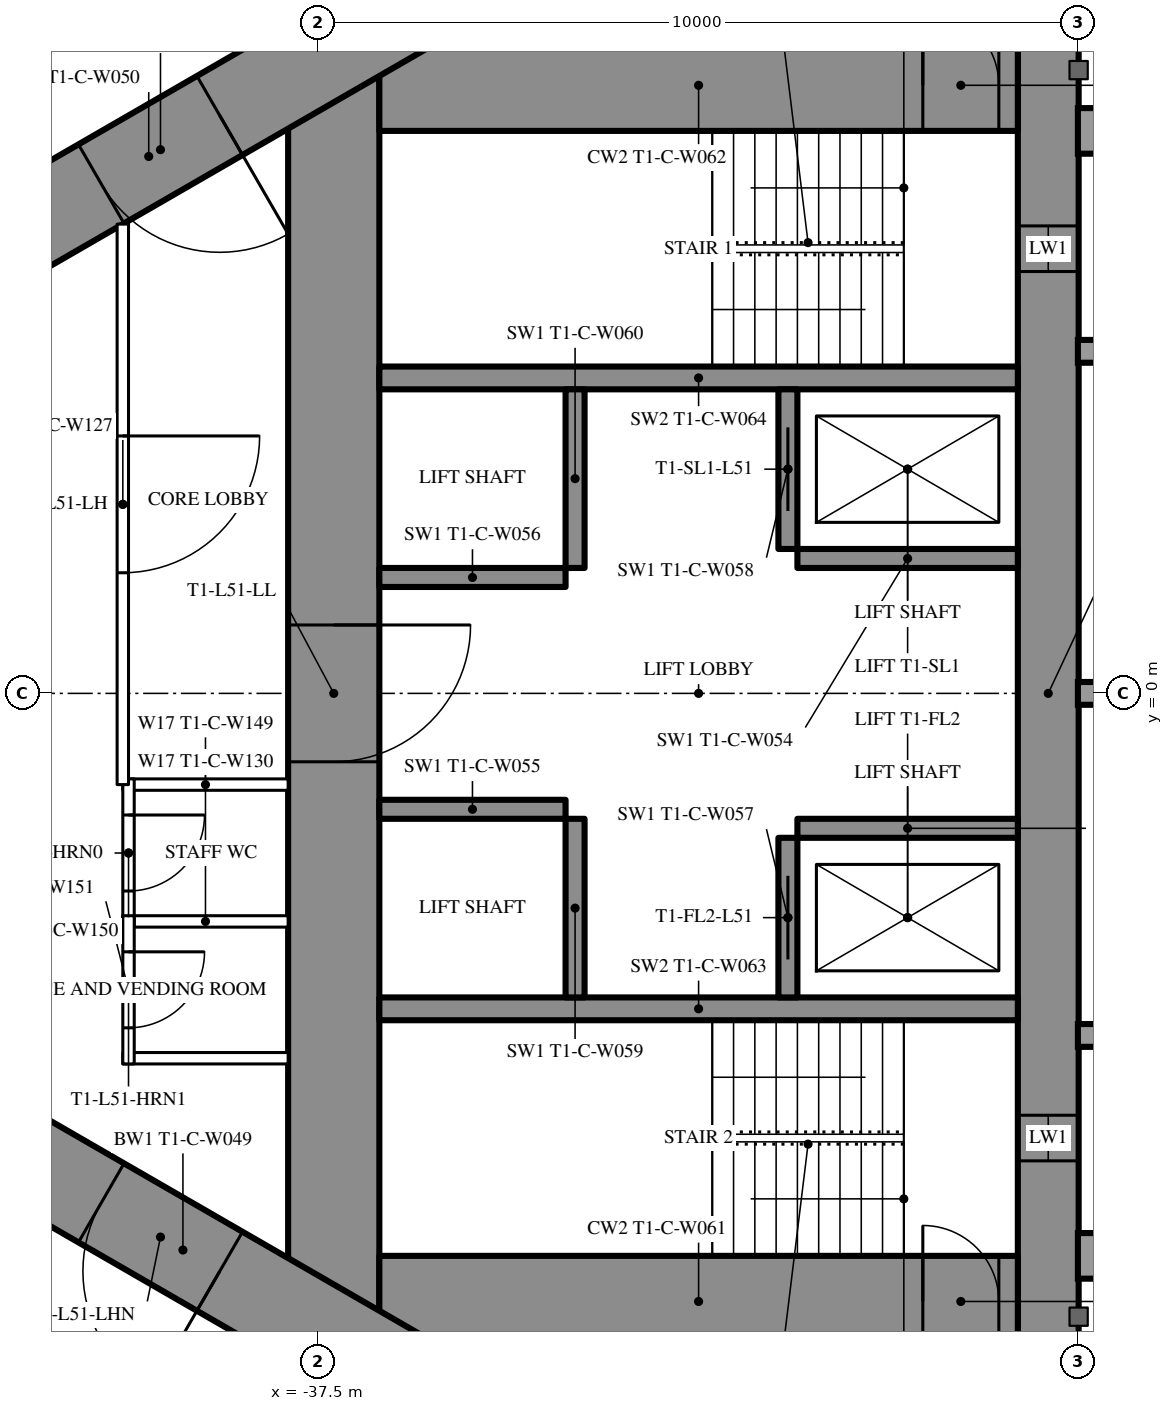
"""IFC4 building model, lengths in metres.
Left out: names, types, materials, properties, quantities, classifications, styles, units other than length and angle.
Written with IfcOpenShell. Run it as: python <this file> out.ifc"""

import sys

from ifc_helpers import new_model, si_unit, direction, frame, frame_2d, origin, place, context, subcontext, project, spatial, rectangle, extrude, element, fill, save


model = new_model("IFC4")
c1 = context("Model", 3, precision=1e-05, world=origin(), true_north=direction((0.0, 1.0)))
c2 = subcontext(c1, "Body", "Model", "MODEL_VIEW")
j1 = project(units=[si_unit("LENGTHUNIT", "METRE"), si_unit("PLANEANGLEUNIT", "RADIAN")], contexts=[c1])
p1 = place(None, origin())
s1 = spatial("IfcSite", under=j1, at=p1, CompositionType="ELEMENT")
p2 = place(p1, origin())
s2 = spatial("IfcBuilding", under=s1, at=p2, CompositionType="ELEMENT")
p3 = place(p2, frame((0.0, 0.0, 191.3)))
s3 = spatial("IfcBuildingStorey", under=s2, at=p3, CompositionType="ELEMENT", Elevation=191.3)
p4 = place(p3, frame((-27.9, 8.6, 0.0), z_axis=(0.0, 0.0, 1.0), x_axis=(0.0, -1.0, 0.0)))
e1 = element("IfcWall", 1, at=p4, inside=s3, PredefinedType="SHEAR", context=c2, shape_type="SweptSolid", body=[
    extrude(rectangle(XDim=17.2, YDim=0.8, at=frame_2d((8.6, 0.0))), origin(), (0.0, 0.0, 1.0), 3.5),
])
p5 = place(p4, frame((2.45, 0.0, 0.6)))
e2 = element("IfcOpeningElement", 2, at=p5, cuts=e1, PredefinedType="OPENING", context=c2, shape_type="SweptSolid", body=[
    extrude(rectangle(XDim=0.6, YDim=2.1, at=frame_2d((0.3, 1.05))), frame((0.0, 0.41, 0.0), z_axis=(0.0, -1.0, 0.0), x_axis=(1.0, 0.0, 0.0)), (0.0, 0.0, 1.0), 0.82),
])
p6 = place(p4, frame((14.15, 0.0, 0.6)))
e3 = element("IfcOpeningElement", 3, at=p6, cuts=e1, PredefinedType="OPENING", context=c2, shape_type="SweptSolid", body=[
    extrude(rectangle(XDim=0.6, YDim=2.1, at=frame_2d((0.3, 1.05))), frame((0.0, 0.41, 0.0), z_axis=(0.0, -1.0, 0.0), x_axis=(1.0, 0.0, 0.0)), (0.0, 0.0, 1.0), 0.82),
])
p7 = place(p3, frame((-37.3, 8.6, 0.0), z_axis=(0.0, 0.0, 1.0), x_axis=(0.0, -1.0, 0.0)))
e4 = element("IfcWall", 4, at=p7, inside=s3, PredefinedType="SHEAR", context=c2, shape_type="SweptSolid", body=[
    extrude(rectangle(XDim=17.2, YDim=1.2, at=frame_2d((8.6, 0.0))), origin(), (0.0, 0.0, 1.0), 3.5),
])
p8 = place(p7, frame((7.7, 0.0, 0.0)))
e5 = element("IfcOpeningElement", 5, at=p8, cuts=e4, PredefinedType="OPENING", context=c2, shape_type="SweptSolid", body=[
    extrude(rectangle(XDim=1.8, YDim=2.2, at=frame_2d((0.9, 1.1))), frame((0.0, 0.61, 0.0), z_axis=(0.0, -1.0, 0.0), x_axis=(1.0, 0.0, 0.0)), (0.0, 0.0, 1.0), 1.22),
])
p9 = place(p3, frame((-28.3, 8.0, 0.0), z_axis=(0.0, 0.0, 1.0), x_axis=(-1.0, 0.0, 0.0)))
e6 = element("IfcWall", 6, at=p9, inside=s3, PredefinedType="SHEAR", context=c2, shape_type="SweptSolid", body=[
    extrude(rectangle(XDim=8.4, YDim=1.2, at=frame_2d((4.2, 0.0))), origin(), (0.0, 0.0, 1.0), 3.5),
])
p10 = place(p9, frame((0.25, 0.0, 0.0)))
e7 = element("IfcOpeningElement", 7, at=p10, cuts=e6, PredefinedType="OPENING", context=c2, shape_type="SweptSolid", body=[
    extrude(rectangle(XDim=1.0, YDim=2.2, at=frame_2d((0.5, 1.1))), frame((0.0, 0.61, 0.0), z_axis=(0.0, -1.0, 0.0), x_axis=(1.0, 0.0, 0.0)), (0.0, 0.0, 1.0), 1.22),
])
p11 = place(p3, frame((-28.3, -8.0, 0.0), z_axis=(0.0, 0.0, 1.0), x_axis=(-1.0, 0.0, 0.0)))
e8 = element("IfcWall", 8, at=p11, inside=s3, PredefinedType="SHEAR", context=c2, shape_type="SweptSolid", body=[
    extrude(rectangle(XDim=8.4, YDim=1.2, at=frame_2d((4.2, 0.0))), origin(), (0.0, 0.0, 1.0), 3.5),
])
p12 = place(p11, frame((0.25, 0.0, 0.0)))
e9 = element("IfcOpeningElement", 9, at=p12, cuts=e8, PredefinedType="OPENING", context=c2, shape_type="SweptSolid", body=[
    extrude(rectangle(XDim=1.0, YDim=2.2, at=frame_2d((0.5, 1.1))), frame((0.0, 0.61, 0.0), z_axis=(0.0, -1.0, 0.0), x_axis=(1.0, 0.0, 0.0)), (0.0, 0.0, 1.0), 1.22),
])
for number, where, z_axis, x_axis in (
    (10, (-28.3, 4.15, 0.0), (0.0, 0.0, 1.0), (-1.0, 0.0, 0.0)),
    (11, (-28.3, -4.15, 0.0), (0.0, 0.0, 1.0), (-1.0, 0.0, 0.0)),
):
    element("IfcWall", number, at=place(p3, frame(where, z_axis=z_axis, x_axis=x_axis)), inside=s3, PredefinedType="SHEAR", context=c2, shape_type="SweptSolid", body=[
        extrude(rectangle(XDim=8.4, YDim=0.3, at=frame_2d((4.2, 0.0))), origin(), (0.0, 0.0, 1.0), 3.5),
    ])
p13 = place(p3, frame((-31.325, 4.0, 0.0), z_axis=(0.0, 0.0, 1.0), x_axis=(0.0, -1.0, 0.0)))
e12 = element("IfcWall", 12, at=p13, inside=s3, PredefinedType="SHEAR", context=c2, shape_type="SweptSolid", body=[
    extrude(rectangle(XDim=2.1, YDim=0.25, at=frame_2d((1.05, 0.0))), origin(), (0.0, 0.0, 1.0), 3.5),
])
p14 = place(p13, frame((0.5, 0.0, 0.0)))
e13 = element("IfcOpeningElement", 13, at=p14, cuts=e12, PredefinedType="OPENING", context=c2, shape_type="SweptSolid", body=[
    extrude(rectangle(XDim=1.1, YDim=2.2, at=frame_2d((0.55, 1.1))), frame((0.0, 0.135, 0.0), z_axis=(0.0, -1.0, 0.0), x_axis=(1.0, 0.0, 0.0)), (0.0, 0.0, 1.0), 0.27),
])
p15 = place(p3, frame((-34.125, 4.0, 0.0), z_axis=(0.0, 0.0, 1.0), x_axis=(0.0, -1.0, 0.0)))
e14 = element("IfcWall", 14, at=p15, inside=s3, PredefinedType="SHEAR", context=c2, shape_type="SweptSolid", body=[
    extrude(rectangle(XDim=2.35, YDim=0.25, at=frame_2d((1.175, 0.0))), origin(), (0.0, 0.0, 1.0), 3.5),
])
p16 = place(p3, frame((-28.3, 1.775, 0.0), z_axis=(0.0, 0.0, 1.0), x_axis=(-1.0, 0.0, 0.0)))
e15 = element("IfcWall", 15, at=p16, inside=s3, PredefinedType="SHEAR", context=c2, shape_type="SweptSolid", body=[
    extrude(rectangle(XDim=2.9, YDim=0.25, at=frame_2d((1.45, 0.0))), origin(), (0.0, 0.0, 1.0), 3.5),
])
p17 = place(p3, frame((-34.25, 1.525, 0.0), z_axis=(0.0, 0.0, 1.0), x_axis=(-1.0, 0.0, 0.0)))
e16 = element("IfcWall", 16, at=p17, inside=s3, PredefinedType="SHEAR", context=c2, shape_type="SweptSolid", body=[
    extrude(rectangle(XDim=2.45, YDim=0.25, at=frame_2d((1.225, 0.0))), origin(), (0.0, 0.0, 1.0), 3.5),
])
p18 = place(p3, frame((-31.325, -1.9, 0.0), z_axis=(0.0, 0.0, 1.0), x_axis=(0.0, -1.0, 0.0)))
e17 = element("IfcWall", 17, at=p18, inside=s3, PredefinedType="SHEAR", context=c2, shape_type="SweptSolid", body=[
    extrude(rectangle(XDim=2.1, YDim=0.25, at=frame_2d((1.05, 0.0))), origin(), (0.0, 0.0, 1.0), 3.5),
])
p19 = place(p18, frame((0.5, 0.0, 0.0)))
e18 = element("IfcOpeningElement", 18, at=p19, cuts=e17, PredefinedType="OPENING", context=c2, shape_type="SweptSolid", body=[
    extrude(rectangle(XDim=1.1, YDim=2.2, at=frame_2d((0.55, 1.1))), frame((0.0, 0.135, 0.0), z_axis=(0.0, -1.0, 0.0), x_axis=(1.0, 0.0, 0.0)), (0.0, 0.0, 1.0), 0.27),
])
p20 = place(p3, frame((-34.125, -1.65, 0.0), z_axis=(0.0, 0.0, 1.0), x_axis=(0.0, -1.0, 0.0)))
e19 = element("IfcWall", 19, at=p20, inside=s3, PredefinedType="SHEAR", context=c2, shape_type="SweptSolid", body=[
    extrude(rectangle(XDim=2.35, YDim=0.25, at=frame_2d((1.175, 0.0))), origin(), (0.0, 0.0, 1.0), 3.5),
])
p21 = place(p3, frame((-28.3, -1.775, 0.0), z_axis=(0.0, 0.0, 1.0), x_axis=(-1.0, 0.0, 0.0)))
e20 = element("IfcWall", 20, at=p21, inside=s3, PredefinedType="SHEAR", context=c2, shape_type="SweptSolid", body=[
    extrude(rectangle(XDim=2.9, YDim=0.25, at=frame_2d((1.45, 0.0))), origin(), (0.0, 0.0, 1.0), 3.5),
])
p22 = place(p3, frame((-34.25, -1.525, 0.0), z_axis=(0.0, 0.0, 1.0), x_axis=(-1.0, 0.0, 0.0)))
e21 = element("IfcWall", 21, at=p22, inside=s3, PredefinedType="SHEAR", context=c2, shape_type="SweptSolid", body=[
    extrude(rectangle(XDim=2.45, YDim=0.25, at=frame_2d((1.225, 0.0))), origin(), (0.0, 0.0, 1.0), 3.5),
])
p23 = place(p3, frame((-27.2, 14.3, 0.0), z_axis=(0.0, 0.0, 1.0), x_axis=(-0.866026593062, -0.499997940104, 0.0)))
e22 = element("IfcWall", 22, at=p23, inside=s3, PredefinedType="SHEAR", context=c2, shape_type="SweptSolid", body=[
    extrude(rectangle(XDim=28.946, YDim=1.2, at=frame_2d((14.473, 0.0))), origin(), (0.0, 0.0, 1.0), 3.5),
])
p24 = place(p23, frame((4.6, 0.0, 0.0)))
e23 = element("IfcOpeningElement", 23, at=p24, cuts=e22, PredefinedType="OPENING", context=c2, shape_type="SweptSolid", body=[
    extrude(rectangle(XDim=1.0, YDim=2.2, at=frame_2d((0.5, 1.1))), frame((0.0, 0.61, 0.0), z_axis=(0.0, -1.0, 0.0), x_axis=(1.0, 0.0, 0.0)), (0.0, 0.0, 1.0), 1.22),
])
p25 = place(p23, frame((13.395, 0.0, 0.0)))
e24 = element("IfcOpeningElement", 24, at=p25, cuts=e22, PredefinedType="OPENING", context=c2, shape_type="SweptSolid", body=[
    extrude(rectangle(XDim=1.8, YDim=2.2, at=frame_2d((0.9, 1.1))), frame((0.0, 0.61, 0.0), z_axis=(0.0, -1.0, 0.0), x_axis=(1.0, 0.0, 0.0)), (0.0, 0.0, 1.0), 1.22),
])
p26 = place(p3, frame((-27.2, -14.3, 0.0), z_axis=(0.0, 0.0, 1.0), x_axis=(-0.866024021859, 0.500002393557, 0.0)))
e25 = element("IfcWall", 25, at=p26, inside=s3, PredefinedType="SHEAR", context=c2, shape_type="SweptSolid", body=[
    extrude(rectangle(XDim=27.907, YDim=1.2, at=frame_2d((13.954, 0.0))), origin(), (0.0, 0.0, 1.0), 3.5),
])
p27 = place(p26, frame((4.6, 0.0, 0.0)))
e26 = element("IfcOpeningElement", 26, at=p27, cuts=e25, PredefinedType="OPENING", context=c2, shape_type="SweptSolid", body=[
    extrude(rectangle(XDim=1.0, YDim=2.2, at=frame_2d((0.5, 1.1))), frame((0.0, 0.61, 0.0), z_axis=(0.0, -1.0, 0.0), x_axis=(1.0, 0.0, 0.0)), (0.0, 0.0, 1.0), 1.22),
])
p28 = place(p26, frame((13.395, 0.0, 0.0)))
e27 = element("IfcOpeningElement", 27, at=p28, cuts=e25, PredefinedType="OPENING", context=c2, shape_type="SweptSolid", body=[
    extrude(rectangle(XDim=1.8, YDim=2.2, at=frame_2d((0.9, 1.1))), frame((0.0, 0.61, 0.0), z_axis=(0.0, -1.0, 0.0), x_axis=(1.0, 0.0, 0.0)), (0.0, 0.0, 1.0), 1.22),
])
p29 = place(p3, frame((-27.86, 16.575, 0.0), z_axis=(0.0, 0.0, 1.0), x_axis=(-0.866025533911, -0.499999774615, 0.0)))
e28 = element("IfcWall", 28, at=p29, inside=s3, PredefinedType="PARTITIONING", context=c2, shape_type="SweptSolid", body=[
    extrude(rectangle(XDim=33.149, YDim=0.2, at=frame_2d((16.575, 0.0))), origin(), (0.0, 0.0, 1.0), 3.25),
])
p30 = place(p29, frame((3.75, 0.0, 0.0)))
e29 = element("IfcOpeningElement", 29, at=p30, cuts=e28, PredefinedType="OPENING", context=c2, shape_type="SweptSolid", body=[
    extrude(rectangle(XDim=1.0, YDim=2.2, at=frame_2d((0.5, 1.1))), frame((0.0, 0.11, 0.0), z_axis=(0.0, -1.0, 0.0), x_axis=(1.0, 0.0, 0.0)), (0.0, 0.0, 1.0), 0.22),
])
p31 = place(p29, frame((16.402, 0.0, 0.0)))
e30 = element("IfcOpeningElement", 30, at=p31, cuts=e28, PredefinedType="OPENING", context=c2, shape_type="SweptSolid", body=[
    extrude(rectangle(XDim=0.95, YDim=2.2, at=frame_2d((0.475, 1.1))), frame((0.0, 0.11, 0.0), z_axis=(0.0, -1.0, 0.0), x_axis=(1.0, 0.0, 0.0)), (0.0, 0.0, 1.0), 0.22),
])
p32 = place(p29, frame((22.047, 0.0, 0.0)))
e31 = element("IfcOpeningElement", 31, at=p32, cuts=e28, PredefinedType="OPENING", context=c2, shape_type="SweptSolid", body=[
    extrude(rectangle(XDim=0.95, YDim=2.2, at=frame_2d((0.475, 1.1))), frame((0.0, 0.11, 0.0), z_axis=(0.0, -1.0, 0.0), x_axis=(1.0, 0.0, 0.0)), (0.0, 0.0, 1.0), 0.22),
])
p33 = place(p29, frame((30.396, 0.0, 0.0)))
e32 = element("IfcOpeningElement", 32, at=p33, cuts=e28, PredefinedType="OPENING", context=c2, shape_type="SweptSolid", body=[
    extrude(rectangle(XDim=1.8, YDim=2.2, at=frame_2d((0.9, 1.1))), frame((0.0, 0.11, 0.0), z_axis=(0.0, -1.0, 0.0), x_axis=(1.0, 0.0, 0.0)), (0.0, 0.0, 1.0), 0.22),
])
for number, where, z_axis, x_axis in (
    (33, (-37.9, -1.2, 0.0), (0.0, 0.0, 1.0), (-1.0, 0.0, 0.0)),
    (34, (-37.9, -3.0, 0.0), (0.0, 0.0, 1.0), (-1.0, 0.0, 0.0)),
    (35, (-37.9, -4.8, 0.0), (0.0, 0.0, 1.0), (-1.0, 0.0, 0.0)),
):
    element("IfcWall", number, at=place(p3, frame(where, z_axis=z_axis, x_axis=x_axis)), inside=s3, PredefinedType="PARTITIONING", context=c2, shape_type="SweptSolid", body=[
        extrude(rectangle(XDim=2.175, YDim=0.15, at=frame_2d((1.087, 0.0))), origin(), (0.0, 0.0, 1.0), 3.25),
    ])
p34 = place(p3, frame((-40.0, -1.125, 0.0), z_axis=(0.0, 0.0, 1.0), x_axis=(0.0, -1.0, 0.0)))
e36 = element("IfcWall", 36, at=p34, inside=s3, PredefinedType="PARTITIONING", context=c2, shape_type="SweptSolid", body=[
    extrude(rectangle(XDim=1.95, YDim=0.15, at=frame_2d((0.975, 0.0))), origin(), (0.0, 0.0, 1.0), 3.25),
])
p35 = place(p34, frame((0.475, 0.0, 0.0)))
e37 = element("IfcOpeningElement", 37, at=p35, cuts=e36, PredefinedType="OPENING", context=c2, shape_type="SweptSolid", body=[
    extrude(rectangle(XDim=1.0, YDim=2.2, at=frame_2d((0.5, 1.1))), frame((0.0, 0.085, 0.0), z_axis=(0.0, -1.0, 0.0), x_axis=(1.0, 0.0, 0.0)), (0.0, 0.0, 1.0), 0.17),
])
p36 = place(p3, frame((-40.0, -2.925, 0.0), z_axis=(0.0, 0.0, 1.0), x_axis=(0.0, -1.0, 0.0)))
e38 = element("IfcWall", 38, at=p36, inside=s3, PredefinedType="PARTITIONING", context=c2, shape_type="SweptSolid", body=[
    extrude(rectangle(XDim=1.95, YDim=0.15, at=frame_2d((0.975, 0.0))), origin(), (0.0, 0.0, 1.0), 3.25),
])
p37 = place(p36, frame((0.475, 0.0, 0.0)))
e39 = element("IfcOpeningElement", 39, at=p37, cuts=e38, PredefinedType="OPENING", context=c2, shape_type="SweptSolid", body=[
    extrude(rectangle(XDim=1.0, YDim=2.2, at=frame_2d((0.5, 1.1))), frame((0.0, 0.085, 0.0), z_axis=(0.0, -1.0, 0.0), x_axis=(1.0, 0.0, 0.0)), (0.0, 0.0, 1.0), 0.17),
])
p38 = place(p3, frame((-40.075, 6.174, 0.0), z_axis=(0.0, 0.0, 1.0), x_axis=(0.0, -1.0, 0.0)))
e40 = element("IfcWall", 40, at=p38, inside=s3, PredefinedType="PARTITIONING", context=c2, shape_type="SweptSolid", body=[
    extrude(rectangle(XDim=7.374, YDim=0.15, at=frame_2d((3.687, 0.0))), origin(), (0.0, 0.0, 1.0), 3.25),
])
p39 = place(p38, frame((2.787, 0.0, 0.0)))
e41 = element("IfcOpeningElement", 41, at=p39, cuts=e40, PredefinedType="OPENING", context=c2, shape_type="SweptSolid", body=[
    extrude(rectangle(XDim=1.8, YDim=2.2, at=frame_2d((0.9, 1.1))), frame((0.0, 0.085, 0.0), z_axis=(0.0, -1.0, 0.0), x_axis=(1.0, 0.0, 0.0)), (0.0, 0.0, 1.0), 0.17),
])
p40 = place(p3, frame((-39.758, -11.697, 0.0), z_axis=(0.0, 0.0, 1.0), x_axis=(-0.866024194504, 0.500002094529, 0.0)))
e42 = element("IfcWall", 42, at=p40, inside=s3, PredefinedType="PARTITIONING", context=c2, shape_type="SweptSolid", body=[
    extrude(rectangle(XDim=6.6, YDim=0.25, at=frame_2d((3.3, 0.0))), origin(), (0.0, 0.0, 1.0), 3.25),
])
p41 = place(p40, frame((0.75, 0.0, 0.0)))
e43 = element("IfcOpeningElement", 43, at=p41, cuts=e42, PredefinedType="OPENING", context=c2, shape_type="SweptSolid", body=[
    extrude(rectangle(XDim=1.1, YDim=2.2, at=frame_2d((0.55, 1.1))), frame((0.0, 0.135, 0.0), z_axis=(0.0, -1.0, 0.0), x_axis=(1.0, 0.0, 0.0)), (0.0, 0.0, 1.0), 0.27),
])
p42 = place(p40, frame((2.75, 0.0, 0.0)))
e44 = element("IfcOpeningElement", 44, at=p42, cuts=e42, PredefinedType="OPENING", context=c2, shape_type="SweptSolid", body=[
    extrude(rectangle(XDim=1.1, YDim=2.2, at=frame_2d((0.55, 1.1))), frame((0.0, 0.135, 0.0), z_axis=(0.0, -1.0, 0.0), x_axis=(1.0, 0.0, 0.0)), (0.0, 0.0, 1.0), 0.27),
])
p43 = place(p40, frame((4.75, 0.0, 0.0)))
e45 = element("IfcOpeningElement", 45, at=p43, cuts=e42, PredefinedType="OPENING", context=c2, shape_type="SweptSolid", body=[
    extrude(rectangle(XDim=1.1, YDim=2.2, at=frame_2d((0.55, 1.1))), frame((0.0, 0.135, 0.0), z_axis=(0.0, -1.0, 0.0), x_axis=(1.0, 0.0, 0.0)), (0.0, 0.0, 1.0), 0.27),
])
p44 = place(p35, origin())
e46 = element("IfcDoor", 46, at=p44, inside=s3, OperationType="SINGLE_SWING_LEFT", PredefinedType="DOOR", context=c2, shape_type="SweptSolid", body=[
    extrude(rectangle(XDim=1.0, YDim=2.2, at=frame_2d((0.5, 1.1))), frame((0.0, 0.025, 0.0), z_axis=(0.0, -1.0, 0.0), x_axis=(1.0, 0.0, 0.0)), (0.0, 0.0, 1.0), 0.05),
])
fill(e37, e46)
p45 = place(p37, origin())
e47 = element("IfcDoor", 47, at=p45, inside=s3, OperationType="SINGLE_SWING_LEFT", PredefinedType="DOOR", context=c2, shape_type="SweptSolid", body=[
    extrude(rectangle(XDim=1.0, YDim=2.2, at=frame_2d((0.5, 1.1))), frame((0.0, 0.025, 0.0), z_axis=(0.0, -1.0, 0.0), x_axis=(1.0, 0.0, 0.0)), (0.0, 0.0, 1.0), 0.05),
])
fill(e39, e47)
p46 = place(p39, origin())
e48 = element("IfcDoor", 48, at=p46, inside=s3, OperationType="DOUBLE_DOOR_SINGLE_SWING", PredefinedType="DOOR", context=c2, shape_type="SweptSolid", body=[
    extrude(rectangle(XDim=1.8, YDim=2.2, at=frame_2d((0.9, 1.1))), frame((0.0, 0.025, 0.0), z_axis=(0.0, -1.0, 0.0), x_axis=(1.0, 0.0, 0.0)), (0.0, 0.0, 1.0), 0.05),
])
fill(e41, e48)
p47 = place(p25, origin())
e49 = element("IfcDoor", 49, at=p47, inside=s3, OperationType="DOUBLE_DOOR_SINGLE_SWING", PredefinedType="DOOR", context=c2, shape_type="SweptSolid", body=[
    extrude(rectangle(XDim=1.8, YDim=2.2, at=frame_2d((0.9, 1.1))), frame((0.0, 0.025, 0.0), z_axis=(0.0, -1.0, 0.0), x_axis=(1.0, 0.0, 0.0)), (0.0, 0.0, 1.0), 0.05),
])
fill(e24, e49)
p48 = place(p28, origin())
e50 = element("IfcDoor", 50, at=p48, inside=s3, OperationType="DOUBLE_DOOR_SINGLE_SWING", PredefinedType="DOOR", context=c2, shape_type="SweptSolid", body=[
    extrude(rectangle(XDim=1.8, YDim=2.2, at=frame_2d((0.9, 1.1))), frame((0.0, 0.025, 0.0), z_axis=(0.0, -1.0, 0.0), x_axis=(1.0, 0.0, 0.0)), (0.0, 0.0, 1.0), 0.05),
])
fill(e27, e50)
p49 = place(p8, origin())
e51 = element("IfcDoor", 51, at=p49, inside=s3, OperationType="DOUBLE_DOOR_SINGLE_SWING", PredefinedType="DOOR", context=c2, shape_type="SweptSolid", body=[
    extrude(rectangle(XDim=1.8, YDim=2.2, at=frame_2d((0.9, 1.1))), frame((0.0, 0.025, 0.0), z_axis=(0.0, -1.0, 0.0), x_axis=(1.0, 0.0, 0.0)), (0.0, 0.0, 1.0), 0.05),
])
fill(e5, e51)
p50 = place(p10, origin())
e52 = element("IfcDoor", 52, at=p50, inside=s3, OperationType="SINGLE_SWING_RIGHT", PredefinedType="DOOR", context=c2, shape_type="SweptSolid", body=[
    extrude(rectangle(XDim=1.0, YDim=2.2, at=frame_2d((0.5, 1.1))), frame((0.0, 0.025, 0.0), z_axis=(0.0, -1.0, 0.0), x_axis=(1.0, 0.0, 0.0)), (0.0, 0.0, 1.0), 0.05),
])
fill(e7, e52)
p51 = place(p12, origin())
e53 = element("IfcDoor", 53, at=p51, inside=s3, OperationType="SINGLE_SWING_RIGHT", PredefinedType="DOOR", context=c2, shape_type="SweptSolid", body=[
    extrude(rectangle(XDim=1.0, YDim=2.2, at=frame_2d((0.5, 1.1))), frame((0.0, 0.025, 0.0), z_axis=(0.0, -1.0, 0.0), x_axis=(1.0, 0.0, 0.0)), (0.0, 0.0, 1.0), 0.05),
])
fill(e9, e53)
p52 = place(p14, origin())
e54 = element("IfcDoor", 54, at=p52, inside=s3, OperationType="SLIDING_TO_LEFT", PredefinedType="USERDEFINED", context=c2, shape_type="SweptSolid", body=[
    extrude(rectangle(XDim=1.1, YDim=2.2, at=frame_2d((0.55, 1.1))), frame((0.0, 0.025, 0.0), z_axis=(0.0, -1.0, 0.0), x_axis=(1.0, 0.0, 0.0)), (0.0, 0.0, 1.0), 0.05),
])
fill(e13, e54)
p53 = place(p19, origin())
e55 = element("IfcDoor", 55, at=p53, inside=s3, OperationType="SLIDING_TO_LEFT", PredefinedType="USERDEFINED", context=c2, shape_type="SweptSolid", body=[
    extrude(rectangle(XDim=1.1, YDim=2.2, at=frame_2d((0.55, 1.1))), frame((0.0, 0.025, 0.0), z_axis=(0.0, -1.0, 0.0), x_axis=(1.0, 0.0, 0.0)), (0.0, 0.0, 1.0), 0.05),
])
fill(e18, e55)
p54 = place(p5, origin())
e56 = element("IfcWindow", 56, at=p54, inside=s3, PartitioningType="SINGLE_PANEL", PredefinedType="WINDOW", context=c2, shape_type="SweptSolid", body=[
    extrude(rectangle(XDim=0.6, YDim=2.1, at=frame_2d((0.3, 1.05))), frame((0.0, 0.03, 0.0), z_axis=(0.0, -1.0, 0.0), x_axis=(1.0, 0.0, 0.0)), (0.0, 0.0, 1.0), 0.06),
])
fill(e2, e56)
p55 = place(p6, origin())
e57 = element("IfcWindow", 57, at=p55, inside=s3, PartitioningType="SINGLE_PANEL", PredefinedType="WINDOW", context=c2, shape_type="SweptSolid", body=[
    extrude(rectangle(XDim=0.6, YDim=2.1, at=frame_2d((0.3, 1.05))), frame((0.0, 0.03, 0.0), z_axis=(0.0, -1.0, 0.0), x_axis=(1.0, 0.0, 0.0)), (0.0, 0.0, 1.0), 0.06),
])
fill(e3, e57)
save(model, sys.argv[1])
